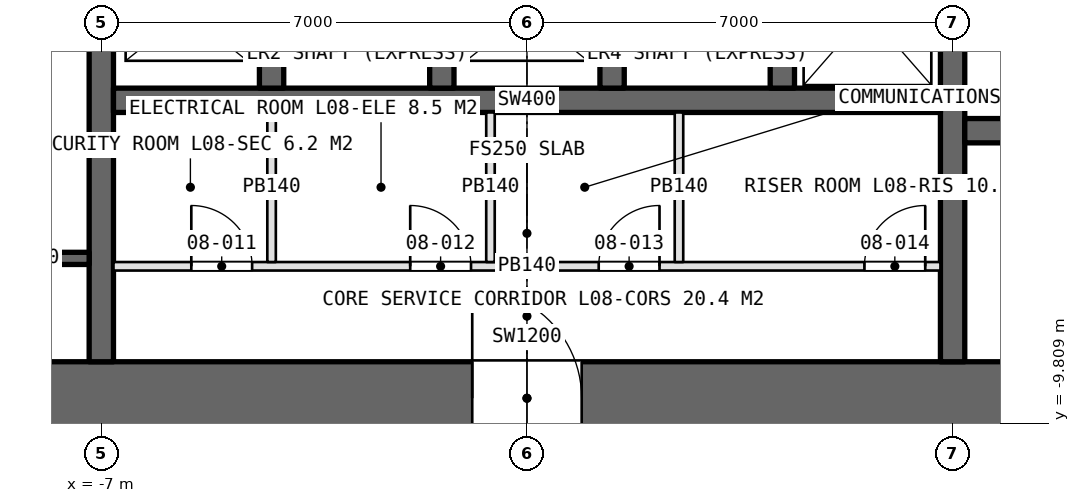
"""IFC4 building model, lengths in metres.
Left out: names, types, materials, properties, quantities, classifications, styles, units other than length and angle.
Written with IfcOpenShell. Run it as: python <this file> out.ifc"""

import sys

from ifc_helpers import new_model, si_unit, direction, frame, frame_2d, origin, place, context, subcontext, project, spatial, rectangle, extrude, element, fill, save


model = new_model("IFC4")
c1 = context("Model", 3, precision=1e-05, world=origin(), true_north=direction((0.0, 1.0)))
c2 = subcontext(c1, "Body", "Model", "MODEL_VIEW")
j1 = project(units=[si_unit("LENGTHUNIT", "METRE"), si_unit("PLANEANGLEUNIT", "RADIAN")], contexts=[c1])
p1 = place(None, origin())
s1 = spatial("IfcSite", under=j1, at=p1, CompositionType="ELEMENT")
p2 = place(p1, origin())
s2 = spatial("IfcBuilding", under=s1, at=p2, CompositionType="ELEMENT")
p3 = place(p2, frame((0.0, 0.0, 40.0)))
s3 = spatial("IfcBuildingStorey", under=s2, at=p3, CompositionType="ELEMENT", Elevation=40.0)
p4 = place(p3, frame((-14.0, -9.4, 0.0), z_axis=(0.0, 0.0, 1.0), x_axis=(1.0, 0.0, 0.0)))
e1 = element("IfcWall", 1, at=p4, inside=s3, PredefinedType="SHEAR", context=c2, shape_type="SweptSolid", body=[
    extrude(rectangle(XDim=28.0, YDim=1.2, at=frame_2d((14.0, 0.0))), origin(), (0.0, 0.0, 1.0), 5.0),
])
p5 = place(p4, frame((13.1, 0.0, 0.0)))
e2 = element("IfcOpeningElement", 2, at=p5, cuts=e1, PredefinedType="OPENING", context=c2, shape_type="SweptSolid", body=[
    extrude(rectangle(XDim=1.8, YDim=2.4, at=frame_2d((0.9, 1.2))), frame((0.0, 0.61, 0.0), z_axis=(0.0, -1.0, 0.0), x_axis=(1.0, 0.0, 0.0)), (0.0, 0.0, 1.0), 1.22),
])
p6 = place(p4, frame((22.9, 0.0, 0.0)))
e3 = element("IfcOpeningElement", 3, at=p6, cuts=e1, PredefinedType="OPENING", context=c2, shape_type="SweptSolid", body=[
    extrude(rectangle(XDim=2.2, YDim=2.7, at=frame_2d((1.1, 1.35))), frame((0.0, 0.61, 0.0), z_axis=(0.0, -1.0, 0.0), x_axis=(1.0, 0.0, 0.0)), (0.0, 0.0, 1.0), 1.22),
])
p7 = place(p3, frame((-7.0, -8.8, 0.0), z_axis=(0.0, 0.0, 1.0), x_axis=(0.0, 1.0, 0.0)))
e4 = element("IfcWall", 4, at=p7, inside=s3, PredefinedType="SHEAR", context=c2, shape_type="SweptSolid", body=[
    extrude(rectangle(XDim=17.6, YDim=0.4, at=frame_2d((8.8, 0.0))), origin(), (0.0, 0.0, 1.0), 5.0),
])
p8 = place(p7, frame((7.9, 0.0, 0.0)))
e5 = element("IfcOpeningElement", 5, at=p8, cuts=e4, PredefinedType="OPENING", context=c2, shape_type="SweptSolid", body=[
    extrude(rectangle(XDim=1.8, YDim=2.4, at=frame_2d((0.9, 1.2))), frame((0.0, 0.21, 0.0), z_axis=(0.0, -1.0, 0.0), x_axis=(1.0, 0.0, 0.0)), (0.0, 0.0, 1.0), 0.42),
])
p9 = place(p3, frame((7.0, -8.8, 0.0), z_axis=(0.0, 0.0, 1.0), x_axis=(0.0, 1.0, 0.0)))
e6 = element("IfcWall", 6, at=p9, inside=s3, PredefinedType="SHEAR", context=c2, shape_type="SweptSolid", body=[
    extrude(rectangle(XDim=17.6, YDim=0.4, at=frame_2d((8.8, 0.0))), origin(), (0.0, 0.0, 1.0), 5.0),
])
p10 = place(p9, frame((7.9, 0.0, 0.0)))
e7 = element("IfcOpeningElement", 7, at=p10, cuts=e6, PredefinedType="OPENING", context=c2, shape_type="SweptSolid", body=[
    extrude(rectangle(XDim=1.8, YDim=2.4, at=frame_2d((0.9, 1.2))), frame((0.0, 0.21, 0.0), z_axis=(0.0, -1.0, 0.0), x_axis=(1.0, 0.0, 0.0)), (0.0, 0.0, 1.0), 0.42),
])
p11 = place(p3, frame((-6.8, -4.5, 0.0), z_axis=(0.0, 0.0, 1.0), x_axis=(1.0, 0.0, 0.0)))
e8 = element("IfcWall", 8, at=p11, inside=s3, PredefinedType="SHEAR", context=c2, shape_type="SweptSolid", body=[
    extrude(rectangle(XDim=13.6, YDim=0.4, at=frame_2d((6.8, 0.0))), origin(), (0.0, 0.0, 1.0), 5.0),
])
p12 = place(p3, frame((7.2, -5.0, 0.0), z_axis=(0.0, 0.0, 1.0), x_axis=(1.0, 0.0, 0.0)))
e9 = element("IfcWall", 9, at=p12, inside=s3, PredefinedType="SHEAR", context=c2, shape_type="SweptSolid", body=[
    extrude(rectangle(XDim=5.6, YDim=0.4, at=frame_2d((2.8, 0.0))), origin(), (0.0, 0.0, 1.0), 5.0),
])
for number, where, z_axis, x_axis in (
    (10, (-4.2, -4.3, 0.0), (0.0, 0.0, 1.0), (0.0, 1.0, 0.0)),
    (11, (-1.4, -4.3, 0.0), (0.0, 0.0, 1.0), (0.0, 1.0, 0.0)),
    (12, (1.4, -4.3, 0.0), (0.0, 0.0, 1.0), (0.0, 1.0, 0.0)),
    (13, (4.2, -4.3, 0.0), (0.0, 0.0, 1.0), (0.0, 1.0, 0.0)),
):
    element("IfcWall", number, at=place(p3, frame(where, z_axis=z_axis, x_axis=x_axis)), inside=s3, PredefinedType="SHEAR", context=c2, shape_type="SweptSolid", body=[
        extrude(rectangle(XDim=2.5, YDim=0.4, at=frame_2d((1.25, 0.0))), origin(), (0.0, 0.0, 1.0), 5.0),
    ])
p13 = place(p3, frame((-6.8, -7.23, 0.0), z_axis=(0.0, 0.0, 1.0), x_axis=(1.0, 0.0, 0.0)))
e14 = element("IfcWall", 14, at=p13, inside=s3, PredefinedType="PARTITIONING", context=c2, shape_type="SweptSolid", body=[
    extrude(rectangle(XDim=13.6, YDim=0.14, at=frame_2d((6.8, 0.0))), origin(), (0.0, 0.0, 1.0), 4.75),
])
p14 = place(p13, frame((1.28, 0.0, 0.0)))
e15 = element("IfcOpeningElement", 15, at=p14, cuts=e14, PredefinedType="OPENING", context=c2, shape_type="SweptSolid", body=[
    extrude(rectangle(XDim=1.0, YDim=2.4, at=frame_2d((0.5, 1.2))), frame((0.0, 0.08, 0.0), z_axis=(0.0, -1.0, 0.0), x_axis=(1.0, 0.0, 0.0)), (0.0, 0.0, 1.0), 0.16),
])
p15 = place(p13, frame((4.88, 0.0, 0.0)))
e16 = element("IfcOpeningElement", 16, at=p15, cuts=e14, PredefinedType="OPENING", context=c2, shape_type="SweptSolid", body=[
    extrude(rectangle(XDim=1.0, YDim=2.4, at=frame_2d((0.5, 1.2))), frame((0.0, 0.08, 0.0), z_axis=(0.0, -1.0, 0.0), x_axis=(1.0, 0.0, 0.0)), (0.0, 0.0, 1.0), 0.16),
])
p16 = place(p13, frame((7.98, 0.0, 0.0)))
e17 = element("IfcOpeningElement", 17, at=p16, cuts=e14, PredefinedType="OPENING", context=c2, shape_type="SweptSolid", body=[
    extrude(rectangle(XDim=1.0, YDim=2.4, at=frame_2d((0.5, 1.2))), frame((0.0, 0.08, 0.0), z_axis=(0.0, -1.0, 0.0), x_axis=(1.0, 0.0, 0.0)), (0.0, 0.0, 1.0), 0.16),
])
p17 = place(p13, frame((12.35, 0.0, 0.0)))
e18 = element("IfcOpeningElement", 18, at=p17, cuts=e14, PredefinedType="OPENING", context=c2, shape_type="SweptSolid", body=[
    extrude(rectangle(XDim=1.0, YDim=2.4, at=frame_2d((0.5, 1.2))), frame((0.0, 0.08, 0.0), z_axis=(0.0, -1.0, 0.0), x_axis=(1.0, 0.0, 0.0)), (0.0, 0.0, 1.0), 0.16),
])
for number, where, z_axis, x_axis in (
    (19, (-4.2, -4.7, 0.0), (0.0, 0.0, 1.0), (0.0, -1.0, 0.0)),
    (20, (-0.6, -4.7, 0.0), (0.0, 0.0, 1.0), (0.0, -1.0, 0.0)),
    (21, (2.5, -4.7, 0.0), (0.0, 0.0, 1.0), (0.0, -1.0, 0.0)),
):
    element("IfcWall", number, at=place(p3, frame(where, z_axis=z_axis, x_axis=x_axis)), inside=s3, PredefinedType="PARTITIONING", context=c2, shape_type="SweptSolid", body=[
        extrude(rectangle(XDim=2.46, YDim=0.14, at=frame_2d((1.23, 0.0))), origin(), (0.0, 0.0, 1.0), 4.75),
    ])
p18 = place(p3, frame((-9.15, -7.1, 0.0), z_axis=(0.0, 0.0, 1.0), x_axis=(1.0, 0.0, 0.0)))
e22 = element("IfcWall", 22, at=p18, inside=s3, PredefinedType="SOLIDWALL", context=c2, shape_type="SweptSolid", body=[
    extrude(rectangle(XDim=1.95, YDim=0.2, at=frame_2d((0.975, 0.0))), origin(), (0.0, 0.0, 1.0), 5.0),
])
p19 = place(p14, origin())
e23 = element("IfcDoor", 23, at=p19, inside=s3, OperationType="SINGLE_SWING_LEFT", PredefinedType="DOOR", context=c2, shape_type="SweptSolid", body=[
    extrude(rectangle(XDim=1.0, YDim=2.4, at=frame_2d((0.5, 1.2))), frame((0.0, 0.025, 0.0), z_axis=(0.0, -1.0, 0.0), x_axis=(1.0, 0.0, 0.0)), (0.0, 0.0, 1.0), 0.05),
])
fill(e15, e23)
p20 = place(p15, origin())
e24 = element("IfcDoor", 24, at=p20, inside=s3, OperationType="SINGLE_SWING_LEFT", PredefinedType="DOOR", context=c2, shape_type="SweptSolid", body=[
    extrude(rectangle(XDim=1.0, YDim=2.4, at=frame_2d((0.5, 1.2))), frame((0.0, 0.025, 0.0), z_axis=(0.0, -1.0, 0.0), x_axis=(1.0, 0.0, 0.0)), (0.0, 0.0, 1.0), 0.05),
])
fill(e16, e24)
p21 = place(p16, origin())
e25 = element("IfcDoor", 25, at=p21, inside=s3, OperationType="SINGLE_SWING_RIGHT", PredefinedType="DOOR", context=c2, shape_type="SweptSolid", body=[
    extrude(rectangle(XDim=1.0, YDim=2.4, at=frame_2d((0.5, 1.2))), frame((0.0, 0.025, 0.0), z_axis=(0.0, -1.0, 0.0), x_axis=(1.0, 0.0, 0.0)), (0.0, 0.0, 1.0), 0.05),
])
fill(e17, e25)
p22 = place(p17, origin())
e26 = element("IfcDoor", 26, at=p22, inside=s3, OperationType="SINGLE_SWING_RIGHT", PredefinedType="DOOR", context=c2, shape_type="SweptSolid", body=[
    extrude(rectangle(XDim=1.0, YDim=2.4, at=frame_2d((0.5, 1.2))), frame((0.0, 0.025, 0.0), z_axis=(0.0, -1.0, 0.0), x_axis=(1.0, 0.0, 0.0)), (0.0, 0.0, 1.0), 0.05),
])
fill(e18, e26)
p23 = place(p5, origin())
e27 = element("IfcDoor", 27, at=p23, inside=s3, OperationType="DOUBLE_DOOR_SINGLE_SWING", PredefinedType="DOOR", context=c2, shape_type="SweptSolid", body=[
    extrude(rectangle(XDim=1.8, YDim=2.4, at=frame_2d((0.9, 1.2))), frame((0.0, 0.025, 0.0), z_axis=(0.0, -1.0, 0.0), x_axis=(1.0, 0.0, 0.0)), (0.0, 0.0, 1.0), 0.05),
])
fill(e2, e27)
save(model, sys.argv[1])
